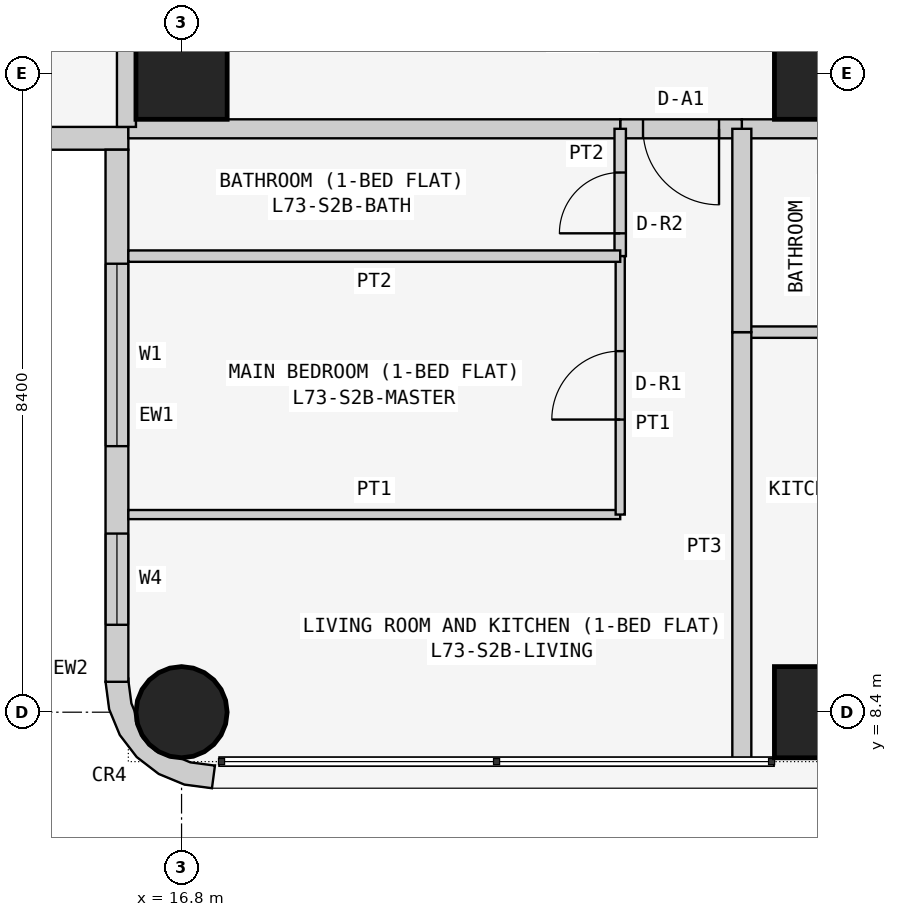
"""IFC4 building model, lengths in metres.
Left out: names, types, materials, properties, quantities, classifications, styles, units other than length and angle.
Written with IfcOpenShell. Run it as: python <this file> out.ifc"""

import sys

from ifc_helpers import new_model, si_unit, direction, frame, frame_2d, origin, origin_2d, place, context, subcontext, project, spatial, polyline, rectangle, circle, outline, extrude, element, fill, save


model = new_model("IFC4")
c1 = context("Model", 3, precision=1e-05, world=origin(), true_north=direction((0.0, 1.0)))
c2 = subcontext(c1, "Body", "Model", "MODEL_VIEW")
j1 = project(units=[si_unit("LENGTHUNIT", "METRE"), si_unit("PLANEANGLEUNIT", "RADIAN")], contexts=[c1])
p1 = place(None, origin())
s1 = spatial("IfcSite", under=j1, at=p1, CompositionType="ELEMENT")
p2 = place(p1, origin())
s2 = spatial("IfcBuilding", under=s1, at=p2, CompositionType="ELEMENT")
p3 = place(p2, frame((0.0, 0.0, 279.3)))
s3 = spatial("IfcBuildingStorey", under=s2, at=p3, CompositionType="ELEMENT", Elevation=279.3)
p4 = place(p3, frame((16.8, 8.4, 0.0), z_axis=(0.0, 0.0, 1.0), x_axis=(1.0, 0.0, 0.0)))
e1 = element("IfcColumn", 1, at=p4, inside=s3, PredefinedType="COLUMN", context=c2, shape_type="SweptSolid", body=[
    extrude(circle(Radius=0.6, at=origin_2d()), origin(), (0.0, 0.0, 1.0), 3.6),
])
for number, where, z_axis, x_axis in (
    (2, (16.8, 16.8, 0.0), (0.0, 0.0, 1.0), (1.0, 0.0, 0.0)),
    (3, (25.2, 8.4, 0.0), (0.0, 0.0, 1.0), (1.0, 0.0, 0.0)),
    (4, (25.2, 16.8, 0.0), (0.0, 0.0, 1.0), (1.0, 0.0, 0.0)),
):
    element("IfcColumn", number, at=place(p3, frame(where, z_axis=z_axis, x_axis=x_axis)), inside=s3, PredefinedType="COLUMN", context=c2, shape_type="SweptSolid", body=[
        extrude(rectangle(XDim=1.2, YDim=1.2, at=origin_2d()), origin(), (0.0, 0.0, 1.0), 3.6),
    ])
p5 = place(p3, frame((8.8, 15.95, 0.0), z_axis=(0.0, 0.0, 1.0), x_axis=(1.0, 0.0, 0.0)))
e5 = element("IfcWall", 5, at=p5, inside=s3, PredefinedType="SOLIDWALL", context=c2, shape_type="SweptSolid", body=[
    extrude(rectangle(XDim=7.3, YDim=0.3, at=frame_2d((3.65, 0.0))), origin(), (0.0, 0.0, 1.0), 3.45),
])
p6 = place(p5, frame((3.1, 0.0, 0.9)))
e6 = element("IfcOpeningElement", 6, at=p6, cuts=e5, PredefinedType="OPENING", context=c2, shape_type="SweptSolid", body=[
    extrude(rectangle(XDim=2.4, YDim=1.5, at=frame_2d((1.2, 0.75))), frame((0.0, 0.16, 0.0), z_axis=(0.0, -1.0, 0.0), x_axis=(1.0, 0.0, 0.0)), (0.0, 0.0, 1.0), 0.32),
])
p7 = place(p5, frame((0.75, 0.0, 0.9)))
e7 = element("IfcOpeningElement", 7, at=p7, cuts=e5, PredefinedType="OPENING", context=c2, shape_type="SweptSolid", body=[
    extrude(rectangle(XDim=1.2, YDim=1.5, at=frame_2d((0.6, 0.75))), frame((0.0, 0.16, 0.0), z_axis=(0.0, -1.0, 0.0), x_axis=(1.0, 0.0, 0.0)), (0.0, 0.0, 1.0), 0.32),
])
p8 = place(p3, frame((15.95, 15.8, 0.0), z_axis=(0.0, 0.0, 1.0), x_axis=(0.0, -1.0, 0.0)))
e8 = element("IfcWall", 8, at=p8, inside=s3, PredefinedType="SOLIDWALL", context=c2, shape_type="SweptSolid", body=[
    extrude(rectangle(XDim=7.0, YDim=0.3, at=frame_2d((3.5, 0.0))), origin(), (0.0, 0.0, 1.0), 3.45),
])
p9 = place(p8, frame((1.5, 0.0, 0.9)))
e9 = element("IfcOpeningElement", 9, at=p9, cuts=e8, PredefinedType="OPENING", context=c2, shape_type="SweptSolid", body=[
    extrude(rectangle(XDim=2.4, YDim=1.5, at=frame_2d((1.2, 0.75))), frame((0.0, 0.16, 0.0), z_axis=(0.0, -1.0, 0.0), x_axis=(1.0, 0.0, 0.0)), (0.0, 0.0, 1.0), 0.32),
])
p10 = place(p8, frame((5.05, 0.0, 0.9)))
e10 = element("IfcOpeningElement", 10, at=p10, cuts=e8, PredefinedType="OPENING", context=c2, shape_type="SweptSolid", body=[
    extrude(rectangle(XDim=1.2, YDim=1.5, at=frame_2d((0.6, 0.75))), frame((0.0, 0.16, 0.0), z_axis=(0.0, -1.0, 0.0), x_axis=(1.0, 0.0, 0.0)), (0.0, 0.0, 1.0), 0.32),
])
p11 = place(p3, frame((16.224, 8.762, 0.0), z_axis=(0.0, 0.0, 1.0), x_axis=(-0.707106781187, -0.707106781187, 0.0)))
e11 = element("IfcWall", 11, at=p11, inside=s3, PredefinedType="SOLIDWALL", context=c2, shape_type="SweptSolid", body=[
    extrude(outline(polyline([(0.033, 1.469), (0.047, 1.455), (0.233, 1.212), (0.292, 1.069), (0.358, 1.003), (0.449, 0.783), (0.449, 0.543), (0.358, 0.322), (0.292, 0.257), (0.233, 0.114), (0.047, -0.129), (0.033, -0.143), (0.273, -0.327), (0.495, -0.037), (0.635, 0.3), (0.683, 0.663), (0.635, 1.025), (0.495, 1.363), (0.273, 1.653), (0.033, 1.469)])), origin(), (0.0, 0.0, 1.0), 3.45),
])
p12 = place(p3, frame((26.8, 16.075, 0.0), z_axis=(0.0, 0.0, 1.0), x_axis=(-1.0, 0.0, 0.0)))
e12 = element("IfcWall", 12, at=p12, inside=s3, PredefinedType="PARTITIONING", context=c2, shape_type="SweptSolid", body=[
    extrude(rectangle(XDim=2.629, YDim=0.25, at=frame_2d((1.314, 0.0))), origin(), (0.0, 0.0, 1.0), 3.45),
])
p13 = place(p3, frame((24.171, 16.075, 0.0), z_axis=(0.0, 0.0, 1.0), x_axis=(-1.0, 0.0, 0.0)))
e13 = element("IfcWall", 13, at=p13, inside=s3, PredefinedType="PARTITIONING", context=c2, shape_type="SweptSolid", body=[
    extrude(rectangle(XDim=1.6, YDim=0.25, at=frame_2d((0.8, 0.0))), origin(), (0.0, 0.0, 1.0), 3.45),
])
p14 = place(p13, frame((0.3, 0.0, 0.0)))
e14 = element("IfcOpeningElement", 14, at=p14, cuts=e13, PredefinedType="OPENING", context=c2, shape_type="SweptSolid", body=[
    extrude(rectangle(XDim=1.0, YDim=2.1, at=frame_2d((0.5, 1.05))), frame((0.0, 0.135, 0.0), z_axis=(0.0, -1.0, 0.0), x_axis=(1.0, 0.0, 0.0)), (0.0, 0.0, 1.0), 0.27),
])
p15 = place(p3, frame((22.571, 16.075, 0.0), z_axis=(0.0, 0.0, 1.0), x_axis=(-1.0, 0.0, 0.0)))
e15 = element("IfcWall", 15, at=p15, inside=s3, PredefinedType="PARTITIONING", context=c2, shape_type="SweptSolid", body=[
    extrude(rectangle(XDim=6.471, YDim=0.25, at=frame_2d((3.235, 0.0))), origin(), (0.0, 0.0, 1.0), 3.45),
])
p16 = place(p3, frame((16.075, 16.1, 0.0), z_axis=(0.0, 0.0, 1.0), x_axis=(0.0, 1.0, 0.0)))
e16 = element("IfcWall", 16, at=p16, inside=s3, PredefinedType="PARTITIONING", context=c2, shape_type="SweptSolid", body=[
    extrude(rectangle(XDim=6.871, YDim=0.25, at=frame_2d((3.436, 0.0))), origin(), (0.0, 0.0, 1.0), 3.45),
])
p17 = place(p3, frame((24.171, 13.4, 0.0), z_axis=(0.0, 0.0, 1.0), x_axis=(1.0, 0.0, 0.0)))
e17 = element("IfcWall", 17, at=p17, inside=s3, PredefinedType="PARTITIONING", context=c2, shape_type="SweptSolid", body=[
    extrude(rectangle(XDim=2.629, YDim=0.15, at=frame_2d((1.314, 0.0))), origin(), (0.0, 0.0, 1.0), 3.45),
])
p18 = place(p3, frame((24.171, 7.75, 0.0), z_axis=(0.0, 0.0, 1.0), x_axis=(0.0, 1.0, 0.0)))
e18 = element("IfcWall", 18, at=p18, inside=s3, PredefinedType="PARTITIONING", context=c2, shape_type="SweptSolid", body=[
    extrude(rectangle(XDim=5.65, YDim=0.25, at=frame_2d((2.825, 0.0))), origin(), (0.0, 0.0, 1.0), 3.45),
])
p19 = place(p3, frame((24.171, 13.4, 0.0), z_axis=(0.0, 0.0, 1.0), x_axis=(0.0, 1.0, 0.0)))
e19 = element("IfcWall", 19, at=p19, inside=s3, PredefinedType="PARTITIONING", context=c2, shape_type="SweptSolid", body=[
    extrude(rectangle(XDim=2.675, YDim=0.25, at=frame_2d((1.337, 0.0))), origin(), (0.0, 0.0, 1.0), 3.45),
])
p20 = place(p3, frame((22.571, 14.4, 0.0), z_axis=(0.0, 0.0, 1.0), x_axis=(0.0, 1.0, 0.0)))
e20 = element("IfcWall", 20, at=p20, inside=s3, PredefinedType="PARTITIONING", context=c2, shape_type="SweptSolid", body=[
    extrude(rectangle(XDim=1.675, YDim=0.15, at=frame_2d((0.837, 0.0))), origin(), (0.0, 0.0, 1.0), 3.45),
])
p21 = place(p20, frame((0.3, 0.0, 0.0)))
e21 = element("IfcOpeningElement", 21, at=p21, cuts=e20, PredefinedType="OPENING", context=c2, shape_type="SweptSolid", body=[
    extrude(rectangle(XDim=0.8, YDim=2.1, at=frame_2d((0.4, 1.05))), frame((0.0, 0.085, 0.0), z_axis=(0.0, -1.0, 0.0), x_axis=(1.0, 0.0, 0.0)), (0.0, 0.0, 1.0), 0.17),
])
p22 = place(p3, frame((16.1, 11.0, 0.0), z_axis=(0.0, 0.0, 1.0), x_axis=(1.0, 0.0, 0.0)))
e22 = element("IfcWall", 22, at=p22, inside=s3, PredefinedType="PARTITIONING", context=c2, shape_type="SweptSolid", body=[
    extrude(rectangle(XDim=6.471, YDim=0.12, at=frame_2d((3.235, 0.0))), origin(), (0.0, 0.0, 1.0), 3.45),
])
p23 = place(p3, frame((22.571, 11.0, 0.0), z_axis=(0.0, 0.0, 1.0), x_axis=(0.0, 1.0, 0.0)))
e23 = element("IfcWall", 23, at=p23, inside=s3, PredefinedType="PARTITIONING", context=c2, shape_type="SweptSolid", body=[
    extrude(rectangle(XDim=3.4, YDim=0.12, at=frame_2d((1.7, 0.0))), origin(), (0.0, 0.0, 1.0), 3.45),
])
p24 = place(p23, frame((1.25, 0.0, 0.0)))
e24 = element("IfcOpeningElement", 24, at=p24, cuts=e23, PredefinedType="OPENING", context=c2, shape_type="SweptSolid", body=[
    extrude(rectangle(XDim=0.9, YDim=2.1, at=frame_2d((0.45, 1.05))), frame((0.0, 0.07, 0.0), z_axis=(0.0, -1.0, 0.0), x_axis=(1.0, 0.0, 0.0)), (0.0, 0.0, 1.0), 0.14),
])
p25 = place(p3, frame((22.571, 14.4, 0.0), z_axis=(0.0, 0.0, 1.0), x_axis=(-1.0, 0.0, 0.0)))
e25 = element("IfcWall", 25, at=p25, inside=s3, PredefinedType="PARTITIONING", context=c2, shape_type="SweptSolid", body=[
    extrude(rectangle(XDim=6.471, YDim=0.15, at=frame_2d((3.235, 0.0))), origin(), (0.0, 0.0, 1.0), 3.45),
])
p26 = place(p9, origin())
e26 = element("IfcWindow", 26, at=p26, inside=s3, PartitioningType="SINGLE_PANEL", PredefinedType="WINDOW", context=c2, shape_type="SweptSolid", body=[
    extrude(rectangle(XDim=2.4, YDim=1.5, at=frame_2d((1.2, 0.75))), frame((0.0, 0.03, 0.0), z_axis=(0.0, -1.0, 0.0), x_axis=(1.0, 0.0, 0.0)), (0.0, 0.0, 1.0), 0.06),
])
fill(e9, e26)
p27 = place(p10, origin())
e27 = element("IfcWindow", 27, at=p27, inside=s3, PartitioningType="SINGLE_PANEL", PredefinedType="WINDOW", context=c2, shape_type="SweptSolid", body=[
    extrude(rectangle(XDim=1.2, YDim=1.5, at=frame_2d((0.6, 0.75))), frame((0.0, 0.03, 0.0), z_axis=(0.0, -1.0, 0.0), x_axis=(1.0, 0.0, 0.0)), (0.0, 0.0, 1.0), 0.06),
])
fill(e10, e27)
p28 = place(p14, origin())
e28 = element("IfcDoor", 28, at=p28, inside=s3, OperationType="SINGLE_SWING_LEFT", PredefinedType="DOOR", context=c2, shape_type="SweptSolid", body=[
    extrude(rectangle(XDim=1.0, YDim=2.1, at=frame_2d((0.5, 1.05))), frame((0.0, 0.025, 0.0), z_axis=(0.0, -1.0, 0.0), x_axis=(1.0, 0.0, 0.0)), (0.0, 0.0, 1.0), 0.05),
])
fill(e14, e28)
p29 = place(p21, origin())
e29 = element("IfcDoor", 29, at=p29, inside=s3, OperationType="SINGLE_SWING_LEFT", PredefinedType="DOOR", context=c2, shape_type="SweptSolid", body=[
    extrude(rectangle(XDim=0.8, YDim=2.1, at=frame_2d((0.4, 1.05))), frame((0.0, 0.025, 0.0), z_axis=(0.0, -1.0, 0.0), x_axis=(1.0, 0.0, 0.0)), (0.0, 0.0, 1.0), 0.05),
])
fill(e21, e29)
p30 = place(p24, origin())
e30 = element("IfcDoor", 30, at=p30, inside=s3, OperationType="SINGLE_SWING_LEFT", PredefinedType="DOOR", context=c2, shape_type="SweptSolid", body=[
    extrude(rectangle(XDim=0.9, YDim=2.1, at=frame_2d((0.45, 1.05))), frame((0.0, 0.025, 0.0), z_axis=(0.0, -1.0, 0.0), x_axis=(1.0, 0.0, 0.0)), (0.0, 0.0, 1.0), 0.05),
])
fill(e24, e30)
save(model, sys.argv[1])
